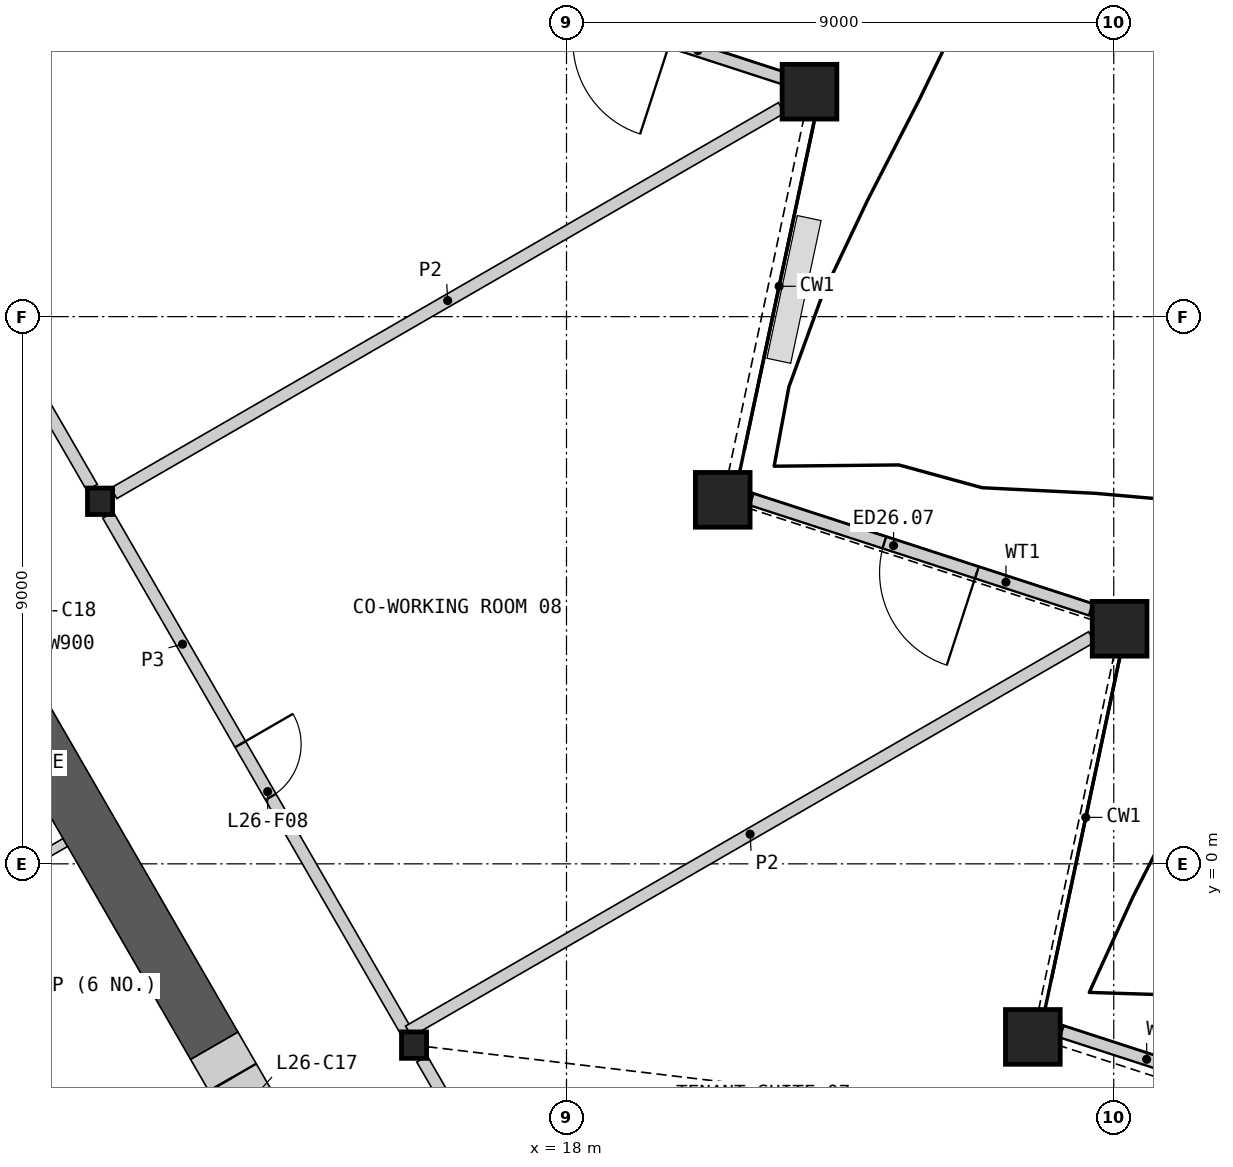
"""IFC4 building model, lengths in metres.
Left out: names, types, materials, properties, quantities, classifications, styles, units other than length and angle.
Written with IfcOpenShell. Run it as: python <this file> out.ifc"""

import sys

from ifc_helpers import new_model, si_unit, direction, frame, frame_2d, origin, origin_2d, place, context, subcontext, project, spatial, polyline, rectangle, hollow_rectangle, i_section, outline, extrude, element, fill, save


model = new_model("IFC4")
c1 = context("Model", 3, precision=1e-05, world=origin(), true_north=direction((0.0, 1.0)))
c2 = subcontext(c1, "Body", "Model", "MODEL_VIEW")
j1 = project(units=[si_unit("LENGTHUNIT", "METRE"), si_unit("PLANEANGLEUNIT", "RADIAN")], contexts=[c1])
p1 = place(None, origin())
s1 = spatial("IfcSite", under=j1, at=p1, CompositionType="ELEMENT")
p2 = place(p1, origin())
s2 = spatial("IfcBuilding", under=s1, at=p2, CompositionType="ELEMENT")
p3 = place(p2, frame((0.0, 0.0, 124.8)))
s3 = spatial("IfcBuildingStorey", under=s2, at=p3, CompositionType="ELEMENT", Elevation=124.8)
for number, where, z_axis, x_axis in (
    (1, (25.669, -2.846, 0.0), (0.0, 0.0, 1.0), (1.0, 0.0, 0.0)),
    (2, (27.096, 3.866, 0.0), (0.0, 0.0, 1.0), (1.0, 0.0, 0.0)),
    (3, (20.57, 5.987, 0.0), (0.0, 0.0, 1.0), (1.0, 0.0, 0.0)),
    (4, (21.996, 12.699, 0.0), (0.0, 0.0, 1.0), (1.0, 0.0, 0.0)),
):
    element("IfcColumn", number, at=place(p3, frame(where, z_axis=z_axis, x_axis=x_axis)), inside=s3, PredefinedType="COLUMN", context=c2, shape_type="SweptSolid", body=[
        extrude(hollow_rectangle(XDim=0.9, YDim=0.9, WallThickness=0.06, at=origin_2d()), origin(), (0.0, 0.0, 1.0), 4.2),
    ])
for number, where, z_axis, x_axis in (
    (5, (15.493, -2.982, 0.0), (0.0, 0.0, 1.0), (1.0, 0.0, 0.0)),
    (6, (10.328, 5.963, 0.0), (0.0, 0.0, 1.0), (1.0, 0.0, 0.0)),
):
    element("IfcColumn", number, at=place(p3, frame(where, z_axis=z_axis, x_axis=x_axis)), inside=s3, PredefinedType="COLUMN", context=c2, shape_type="SweptSolid", body=[
        extrude(i_section(OverallWidth=0.412, OverallDepth=0.435, WebThickness=0.036, FlangeThickness=0.057, at=origin_2d()), origin(), (0.0, 0.0, 1.0), 4.2),
    ])
p4 = place(p3, frame((31.734, -4.577, 0.0), z_axis=(0.0, 0.0, 1.0), x_axis=(-0.951060927669, 0.309003417231, 0.0)))
e7 = element("IfcWall", 7, at=p4, inside=s3, PredefinedType="SOLIDWALL", context=c2, shape_type="SweptSolid", body=[
    extrude(rectangle(XDim=5.877, YDim=0.2, at=frame_2d((2.939, 0.0))), origin(), (0.0, 0.0, 1.0), 3.189),
])
p5 = place(p4, frame((2.042, 0.0, 0.0)))
e8 = element("IfcOpeningElement", 8, at=p5, cuts=e7, PredefinedType="OPENING", context=c2, shape_type="SweptSolid", body=[
    extrude(rectangle(XDim=1.6, YDim=2.4, at=frame_2d((0.8, 1.2))), frame((0.0, 0.11, 0.0), z_axis=(0.0, -1.0, 0.0), x_axis=(1.0, 0.0, 0.0)), (0.0, 0.0, 1.0), 0.22),
])
p6 = place(p3, frame((26.622, 4.181, 0.0), z_axis=(0.0, 0.0, 1.0), x_axis=(-0.951053952554, 0.309024884649, 0.0)))
e9 = element("IfcWall", 9, at=p6, inside=s3, PredefinedType="SOLIDWALL", context=c2, shape_type="SweptSolid", body=[
    extrude(rectangle(XDim=5.865, YDim=0.2, at=frame_2d((2.932, 0.0))), origin(), (0.0, 0.0, 1.0), 3.189),
])
p7 = place(p6, frame((1.969, 0.0, 0.0)))
e10 = element("IfcOpeningElement", 10, at=p7, cuts=e9, PredefinedType="OPENING", context=c2, shape_type="SweptSolid", body=[
    extrude(rectangle(XDim=1.6, YDim=2.4, at=frame_2d((0.8, 1.2))), frame((0.0, 0.11, 0.0), z_axis=(0.0, -1.0, 0.0), x_axis=(1.0, 0.0, 0.0)), (0.0, 0.0, 1.0), 0.22),
])
p8 = place(p3, frame((21.567, 12.92, 0.0), z_axis=(0.0, 0.0, 1.0), x_axis=(-0.951051366173, 0.309032844373, 0.0)))
e11 = element("IfcWall", 11, at=p8, inside=s3, PredefinedType="SOLIDWALL", context=c2, shape_type="SweptSolid", body=[
    extrude(rectangle(XDim=5.912, YDim=0.2, at=frame_2d((2.956, 0.0))), origin(), (0.0, 0.0, 1.0), 3.189),
])
p9 = place(p8, frame((1.957, 0.0, 0.0)))
e12 = element("IfcOpeningElement", 12, at=p9, cuts=e11, PredefinedType="OPENING", context=c2, shape_type="SweptSolid", body=[
    extrude(rectangle(XDim=1.6, YDim=2.4, at=frame_2d((0.8, 1.2))), frame((0.0, 0.11, 0.0), z_axis=(0.0, -1.0, 0.0), x_axis=(1.0, 0.0, 0.0)), (0.0, 0.0, 1.0), 0.22),
])
p10 = place(p3, origin())
e13 = element("IfcWall", 13, at=p10, inside=s3, PredefinedType="SHEAR", context=c2, shape_type="SweptSolid", body=[
    extrude(outline(polyline([(10.032, -4.298), (10.374, -4.206), (5.307, -1.281), (5.182, -1.498), (10.032, -4.298)])), origin(), (0.0, 0.0, 1.0), 3.8),
])
p11 = place(p3, frame((8.268, -0.509, 0.0), z_axis=(0.0, 0.0, 1.0), x_axis=(0.866024871741, 0.500000921525, 0.0)))
e14 = element("IfcWall", 14, at=p11, inside=s3, PredefinedType="PARTITIONING", context=c2, shape_type="SweptSolid", body=[
    extrude(rectangle(XDim=1.72, YDim=0.15, at=frame_2d((0.86, 0.0))), origin(), (0.0, 0.0, 1.0), 3.8),
])
p12 = place(p3, frame((12.208, -2.992, 0.0), z_axis=(0.0, 0.0, 1.0), x_axis=(-0.499990106751, 0.866031115579, 0.0)))
e15 = element("IfcWall", 15, at=p12, inside=s3, PredefinedType="SHEAR", context=c2, shape_type="SweptSolid", body=[
    extrude(rectangle(XDim=6.396, YDim=0.9, at=frame_2d((3.198, 0.0))), origin(), (0.0, 0.0, 1.0), 3.8),
])
p13 = place(p3, frame((13.308, -4.898, 0.0), z_axis=(0.0, 0.0, 1.0), x_axis=(-0.50002983664, 0.866008176907, 0.0)))
e16 = element("IfcWall", 16, at=p13, inside=s3, PredefinedType="SHEAR", context=c2, shape_type="SweptSolid", body=[
    extrude(rectangle(XDim=2.2, YDim=0.9, at=frame_2d((1.1, 0.0))), origin(), (0.0, 0.0, 1.0), 3.8),
])
p14 = place(p13, frame((0.6, 0.0, 0.0)))
e17 = element("IfcOpeningElement", 17, at=p14, cuts=e16, PredefinedType="OPENING", context=c2, shape_type="SweptSolid", body=[
    extrude(rectangle(XDim=1.0, YDim=2.1, at=frame_2d((0.5, 1.05))), frame((0.0, 0.46, 0.0), z_axis=(0.0, -1.0, 0.0), x_axis=(1.0, 0.0, 0.0)), (0.0, 0.0, 1.0), 0.92),
])
p15 = place(p3, frame((10.46, 5.736, 0.0), z_axis=(0.0, 0.0, 1.0), x_axis=(0.500004141693, -0.866023012564, 0.0)))
e18 = element("IfcWall", 18, at=p15, inside=s3, PredefinedType="PARTITIONING", context=c2, shape_type="SweptSolid", body=[
    extrude(rectangle(XDim=9.803, YDim=0.2, at=frame_2d((4.902, 0.0))), origin(), (0.0, 0.0, 1.0), 3.8),
])
p16 = place(p15, frame((4.352, 0.0, 0.0)))
e19 = element("IfcOpeningElement", 19, at=p16, cuts=e18, PredefinedType="OPENING", context=c2, shape_type="SweptSolid", body=[
    extrude(rectangle(XDim=1.0, YDim=2.1, at=frame_2d((0.5, 1.05))), frame((0.0, 0.11, 0.0), z_axis=(0.0, -1.0, 0.0), x_axis=(1.0, 0.0, 0.0)), (0.0, 0.0, 1.0), 0.22),
])
p17 = place(p3, frame((5.295, 14.68, 0.0), z_axis=(0.0, 0.0, 1.0), x_axis=(0.500012035596, -0.866018454918, 0.0)))
e20 = element("IfcWall", 20, at=p17, inside=s3, PredefinedType="PARTITIONING", context=c2, shape_type="SweptSolid", body=[
    extrude(rectangle(XDim=9.803, YDim=0.2, at=frame_2d((4.902, 0.0))), origin(), (0.0, 0.0, 1.0), 3.8),
])
p18 = place(p17, frame((4.052, 0.0, 0.0)))
e21 = element("IfcOpeningElement", 21, at=p18, cuts=e20, PredefinedType="OPENING", context=c2, shape_type="SweptSolid", body=[
    extrude(rectangle(XDim=1.8, YDim=2.1, at=frame_2d((0.9, 1.05))), frame((0.0, 0.11, 0.0), z_axis=(0.0, -1.0, 0.0), x_axis=(1.0, 0.0, 0.0)), (0.0, 0.0, 1.0), 0.22),
])
p19 = place(p3, frame((15.624, -3.209, 0.0), z_axis=(0.0, 0.0, 1.0), x_axis=(0.499997920671, -0.866026604282, 0.0)))
e22 = element("IfcWall", 22, at=p19, inside=s3, PredefinedType="PARTITIONING", context=c2, shape_type="SweptSolid", body=[
    extrude(rectangle(XDim=6.24, YDim=0.2, at=frame_2d((3.12, 0.0))), origin(), (0.0, 0.0, 1.0), 3.8),
])
p20 = place(p19, frame((2.57, 0.0, 0.0)))
e23 = element("IfcOpeningElement", 23, at=p20, cuts=e22, PredefinedType="OPENING", context=c2, shape_type="SweptSolid", body=[
    extrude(rectangle(XDim=1.0, YDim=2.1, at=frame_2d((0.5, 1.05))), frame((0.0, 0.11, 0.0), z_axis=(0.0, -1.0, 0.0), x_axis=(1.0, 0.0, 0.0)), (0.0, 0.0, 1.0), 0.22),
])
p21 = place(p3, frame((15.403, -2.754, 0.0), z_axis=(0.0, 0.0, 1.0), x_axis=(0.866024473704, 0.500001610943, 0.0)))
e24 = element("IfcWall", 24, at=p21, inside=s3, PredefinedType="PARTITIONING", context=c2, shape_type="SweptSolid", body=[
    extrude(rectangle(XDim=12.971, YDim=0.2, at=frame_2d((6.485, 0.0))), origin(), (0.0, 0.0, 1.0), 2.885),
])
p22 = place(p3, frame((10.556, 6.094, 0.0), z_axis=(0.0, 0.0, 1.0), x_axis=(0.86602461759, 0.500001361726, 0.0)))
e25 = element("IfcWall", 25, at=p22, inside=s3, PredefinedType="PARTITIONING", context=c2, shape_type="SweptSolid", body=[
    extrude(rectangle(XDim=12.679, YDim=0.2, at=frame_2d((6.34, 0.0))), origin(), (0.0, 0.0, 1.0), 2.885),
])
p23 = place(p7, origin())
e26 = element("IfcDoor", 26, at=p23, inside=s3, OperationType="DOUBLE_DOOR_SINGLE_SWING", PredefinedType="DOOR", context=c2, shape_type="SweptSolid", body=[
    extrude(rectangle(XDim=1.6, YDim=2.4, at=frame_2d((0.8, 1.2))), frame((0.0, 0.025, 0.0), z_axis=(0.0, -1.0, 0.0), x_axis=(1.0, 0.0, 0.0)), (0.0, 0.0, 1.0), 0.05),
])
fill(e10, e26)
p24 = place(p14, origin())
e27 = element("IfcDoor", 27, at=p24, inside=s3, OperationType="SINGLE_SWING_RIGHT", PredefinedType="DOOR", context=c2, shape_type="SweptSolid", body=[
    extrude(rectangle(XDim=1.0, YDim=2.1, at=frame_2d((0.5, 1.05))), frame((0.0, 0.205, 0.0), z_axis=(0.0, -1.0, 0.0), x_axis=(1.0, 0.0, 0.0)), (0.0, 0.0, 1.0), 0.05),
])
fill(e17, e27)
p25 = place(p16, origin())
e28 = element("IfcDoor", 28, at=p25, inside=s3, OperationType="SINGLE_SWING_LEFT", PredefinedType="DOOR", context=c2, shape_type="SweptSolid", body=[
    extrude(rectangle(XDim=1.0, YDim=2.1, at=frame_2d((0.5, 1.05))), frame((0.0, 0.025, 0.0), z_axis=(0.0, -1.0, 0.0), x_axis=(1.0, 0.0, 0.0)), (0.0, 0.0, 1.0), 0.05),
])
fill(e19, e28)
save(model, sys.argv[1])
